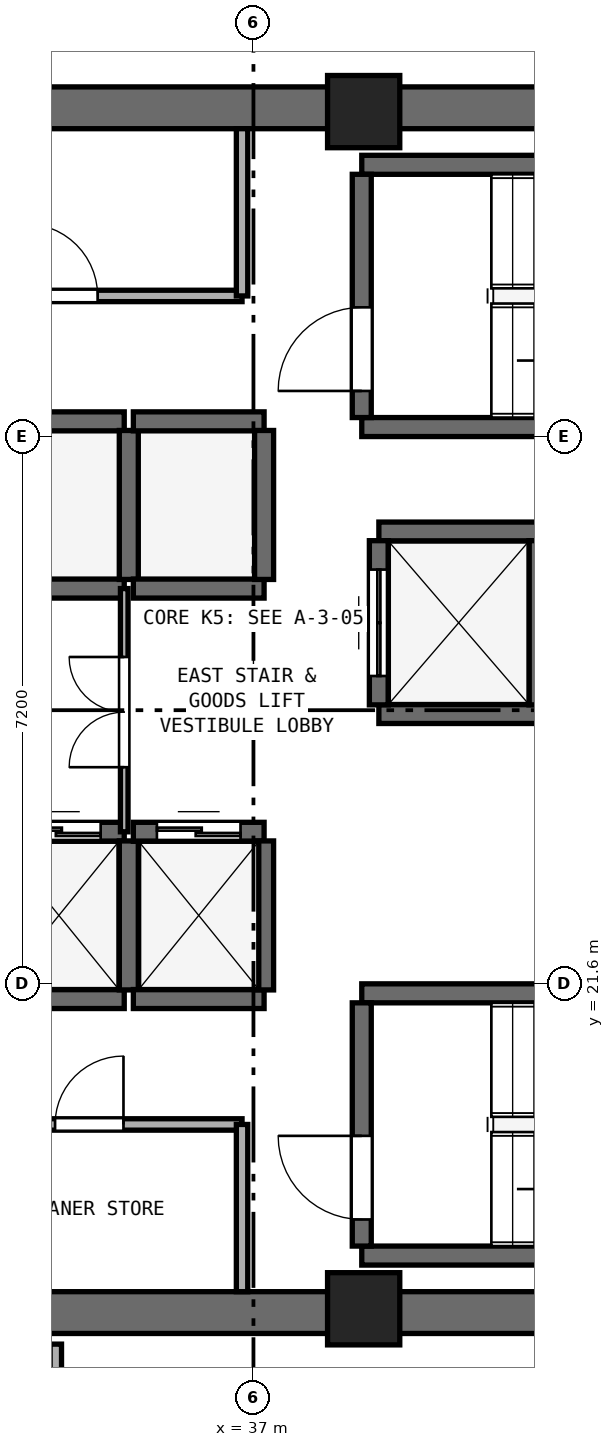
"""IFC4 building model, lengths in metres.
Left out: names, types, materials, properties, quantities, classifications, styles, units other than length and angle.
Written with IfcOpenShell. Run it as: python <this file> out.ifc"""

import sys

from ifc_helpers import new_model, si_unit, direction, frame, frame_2d, origin, origin_2d, place, context, subcontext, project, spatial, rectangle, extrude, element, fill, save


model = new_model("IFC4")
c1 = context("Model", 3, precision=1e-05, world=origin(), true_north=direction((0.0, 1.0)))
c2 = subcontext(c1, "Body", "Model", "MODEL_VIEW")
j1 = project(units=[si_unit("LENGTHUNIT", "METRE"), si_unit("PLANEANGLEUNIT", "RADIAN")], contexts=[c1])
p1 = place(None, origin())
s1 = spatial("IfcSite", under=j1, at=p1, CompositionType="ELEMENT")
p2 = place(p1, origin())
s2 = spatial("IfcBuilding", under=s1, at=p2, CompositionType="ELEMENT")
p3 = place(p2, frame((0.0, 0.0, 170.6)))
s3 = spatial("IfcBuildingStorey", under=s2, at=p3, CompositionType="ELEMENT", Elevation=170.6)
for number, where, z_axis, x_axis in (
    (1, (25.4, 17.275, 0.0), (0.0, 0.0, 1.0), (1.0, 0.0, 0.0)),
    (2, (25.4, 33.125, 0.0), (0.0, 0.0, 1.0), (1.0, 0.0, 0.0)),
):
    element("IfcWall", number, at=place(p3, frame(where, z_axis=z_axis, x_axis=x_axis)), inside=s3, PredefinedType="SHEAR", context=c2, shape_type="SweptSolid", body=[
        extrude(rectangle(XDim=23.2, YDim=0.55, at=frame_2d((11.6, 0.0))), origin(), (0.0, 0.0, 1.0), 3.54),
    ])
for number, where, z_axis, x_axis in (
    (3, (38.45, 17.325, 0.0), (0.0, 0.0, 1.0), (1.0, 0.0, 0.0)),
    (4, (38.45, 33.075, 0.0), (0.0, 0.0, 1.0), (1.0, 0.0, 0.0)),
):
    element("IfcColumn", number, at=place(p3, frame(where, z_axis=z_axis, x_axis=x_axis)), inside=s3, PredefinedType="PILASTER", context=c2, shape_type="SweptSolid", body=[
        extrude(rectangle(XDim=0.95, YDim=0.95, at=origin_2d()), origin(), (0.0, 0.0, 1.0), 3.8),
    ])
for number, where, z_axis, x_axis in (
    (5, (38.425, 28.925, 0.0), (0.0, 0.0, 1.0), (1.0, 0.0, 0.0)),
    (6, (38.425, 32.375, 0.0), (0.0, 0.0, 1.0), (1.0, 0.0, 0.0)),
):
    element("IfcWall", number, at=place(p3, frame(where, z_axis=z_axis, x_axis=x_axis)), inside=s3, PredefinedType="SHEAR", context=c2, shape_type="SweptSolid", body=[
        extrude(rectangle(XDim=7.3, YDim=0.25, at=frame_2d((3.65, 0.0))), origin(), (0.0, 0.0, 1.0), 3.54),
    ])
p4 = place(p3, frame((38.425, 29.05, 0.0), z_axis=(0.0, 0.0, 1.0), x_axis=(0.0, 1.0, 0.0)))
e7 = element("IfcWall", 7, at=p4, inside=s3, PredefinedType="SHEAR", context=c2, shape_type="SweptSolid", body=[
    extrude(rectangle(XDim=3.2, YDim=0.25, at=frame_2d((1.6, 0.0))), origin(), (0.0, 0.0, 1.0), 3.54),
])
p5 = place(p4, frame((0.35, 0.0, 0.0)))
e8 = element("IfcOpeningElement", 8, at=p5, cuts=e7, PredefinedType="OPENING", context=c2, shape_type="SweptSolid", body=[
    extrude(rectangle(XDim=1.1, YDim=2.15, at=frame_2d((0.55, 1.075))), frame((0.0, 0.135, 0.0), z_axis=(0.0, -1.0, 0.0), x_axis=(1.0, 0.0, 0.0)), (0.0, 0.0, 1.0), 0.27),
])
for number, where, z_axis, x_axis in (
    (9, (38.425, 18.025, 0.0), (0.0, 0.0, 1.0), (1.0, 0.0, 0.0)),
    (10, (38.425, 21.475, 0.0), (0.0, 0.0, 1.0), (1.0, 0.0, 0.0)),
):
    element("IfcWall", number, at=place(p3, frame(where, z_axis=z_axis, x_axis=x_axis)), inside=s3, PredefinedType="SHEAR", context=c2, shape_type="SweptSolid", body=[
        extrude(rectangle(XDim=7.3, YDim=0.25, at=frame_2d((3.65, 0.0))), origin(), (0.0, 0.0, 1.0), 3.54),
    ])
p6 = place(p3, frame((38.425, 18.15, 0.0), z_axis=(0.0, 0.0, 1.0), x_axis=(0.0, 1.0, 0.0)))
e11 = element("IfcWall", 11, at=p6, inside=s3, PredefinedType="SHEAR", context=c2, shape_type="SweptSolid", body=[
    extrude(rectangle(XDim=3.2, YDim=0.25, at=frame_2d((1.6, 0.0))), origin(), (0.0, 0.0, 1.0), 3.54),
])
p7 = place(p6, frame((0.35, 0.0, 0.0)))
e12 = element("IfcOpeningElement", 12, at=p7, cuts=e11, PredefinedType="OPENING", context=c2, shape_type="SweptSolid", body=[
    extrude(rectangle(XDim=1.1, YDim=2.15, at=frame_2d((0.55, 1.075))), frame((0.0, 0.135, 0.0), z_axis=(0.0, -1.0, 0.0), x_axis=(1.0, 0.0, 0.0)), (0.0, 0.0, 1.0), 0.27),
])
p8 = place(p3, frame((33.58, 21.4, 0.0), z_axis=(0.0, 0.0, 1.0), x_axis=(1.0, 0.0, 0.0)))
e13 = element("IfcWall", 13, at=p8, inside=s3, PredefinedType="SHEAR", context=c2, shape_type="SweptSolid", body=[
    extrude(rectangle(XDim=1.72, YDim=0.25, at=frame_2d((0.86, 0.0))), origin(), (0.0, 0.0, 1.0), 3.54),
])
p9 = place(p3, frame((33.58, 23.6, 0.0), z_axis=(0.0, 0.0, 1.0), x_axis=(1.0, 0.0, 0.0)))
e14 = element("IfcWall", 14, at=p9, inside=s3, PredefinedType="SHEAR", context=c2, shape_type="SweptSolid", body=[
    extrude(rectangle(XDim=1.72, YDim=0.25, at=frame_2d((0.86, 0.0))), origin(), (0.0, 0.0, 1.0), 3.54),
])
p10 = place(p9, frame((0.31, 0.0, 0.0)))
e15 = element("IfcOpeningElement", 15, at=p10, cuts=e14, PredefinedType="OPENING", context=c2, shape_type="SweptSolid", body=[
    extrude(rectangle(XDim=1.1, YDim=2.15, at=frame_2d((0.55, 1.075))), frame((0.0, 0.135, 0.0), z_axis=(0.0, -1.0, 0.0), x_axis=(1.0, 0.0, 0.0)), (0.0, 0.0, 1.0), 0.27),
])
p11 = place(p3, frame((35.36, 21.52, 0.0), z_axis=(0.0, 0.0, 1.0), x_axis=(0.0, 1.0, 0.0)))
e16 = element("IfcWall", 16, at=p11, inside=s3, PredefinedType="SHEAR", context=c2, shape_type="SweptSolid", body=[
    extrude(rectangle(XDim=1.96, YDim=0.25, at=frame_2d((0.98, 0.0))), origin(), (0.0, 0.0, 1.0), 3.54),
])
p12 = place(p3, frame((35.42, 21.4, 0.0), z_axis=(0.0, 0.0, 1.0), x_axis=(1.0, 0.0, 0.0)))
e17 = element("IfcWall", 17, at=p12, inside=s3, PredefinedType="SHEAR", context=c2, shape_type="SweptSolid", body=[
    extrude(rectangle(XDim=1.72, YDim=0.25, at=frame_2d((0.86, 0.0))), origin(), (0.0, 0.0, 1.0), 3.54),
])
p13 = place(p3, frame((35.42, 23.6, 0.0), z_axis=(0.0, 0.0, 1.0), x_axis=(1.0, 0.0, 0.0)))
e18 = element("IfcWall", 18, at=p13, inside=s3, PredefinedType="SHEAR", context=c2, shape_type="SweptSolid", body=[
    extrude(rectangle(XDim=1.72, YDim=0.25, at=frame_2d((0.86, 0.0))), origin(), (0.0, 0.0, 1.0), 3.54),
])
p14 = place(p13, frame((0.31, 0.0, 0.0)))
e19 = element("IfcOpeningElement", 19, at=p14, cuts=e18, PredefinedType="OPENING", context=c2, shape_type="SweptSolid", body=[
    extrude(rectangle(XDim=1.1, YDim=2.15, at=frame_2d((0.55, 1.075))), frame((0.0, 0.135, 0.0), z_axis=(0.0, -1.0, 0.0), x_axis=(1.0, 0.0, 0.0)), (0.0, 0.0, 1.0), 0.27),
])
p15 = place(p3, frame((37.14, 21.52, 0.0), z_axis=(0.0, 0.0, 1.0), x_axis=(0.0, 1.0, 0.0)))
e20 = element("IfcWall", 20, at=p15, inside=s3, PredefinedType="SHEAR", context=c2, shape_type="SweptSolid", body=[
    extrude(rectangle(XDim=1.96, YDim=0.25, at=frame_2d((0.98, 0.0))), origin(), (0.0, 0.0, 1.0), 3.54),
])
for number, where, z_axis, x_axis in (
    (21, (33.58, 26.8, 0.0), (0.0, 0.0, 1.0), (1.0, 0.0, 0.0)),
    (22, (33.58, 29.0, 0.0), (0.0, 0.0, 1.0), (1.0, 0.0, 0.0)),
):
    element("IfcWall", number, at=place(p3, frame(where, z_axis=z_axis, x_axis=x_axis)), inside=s3, PredefinedType="SHEAR", context=c2, shape_type="SweptSolid", body=[
        extrude(rectangle(XDim=1.72, YDim=0.25, at=frame_2d((0.86, 0.0))), origin(), (0.0, 0.0, 1.0), 3.54),
    ])
p16 = place(p3, frame((35.36, 26.92, 0.0), z_axis=(0.0, 0.0, 1.0), x_axis=(0.0, 1.0, 0.0)))
e23 = element("IfcWall", 23, at=p16, inside=s3, PredefinedType="SHEAR", context=c2, shape_type="SweptSolid", body=[
    extrude(rectangle(XDim=1.96, YDim=0.25, at=frame_2d((0.98, 0.0))), origin(), (0.0, 0.0, 1.0), 3.54),
])
for number, where, z_axis, x_axis in (
    (24, (35.42, 26.8, 0.0), (0.0, 0.0, 1.0), (1.0, 0.0, 0.0)),
    (25, (35.42, 29.0, 0.0), (0.0, 0.0, 1.0), (1.0, 0.0, 0.0)),
):
    element("IfcWall", number, at=place(p3, frame(where, z_axis=z_axis, x_axis=x_axis)), inside=s3, PredefinedType="SHEAR", context=c2, shape_type="SweptSolid", body=[
        extrude(rectangle(XDim=1.72, YDim=0.25, at=frame_2d((0.86, 0.0))), origin(), (0.0, 0.0, 1.0), 3.54),
    ])
p17 = place(p3, frame((37.14, 26.92, 0.0), z_axis=(0.0, 0.0, 1.0), x_axis=(0.0, 1.0, 0.0)))
e26 = element("IfcWall", 26, at=p17, inside=s3, PredefinedType="SHEAR", context=c2, shape_type="SweptSolid", body=[
    extrude(rectangle(XDim=1.96, YDim=0.25, at=frame_2d((0.98, 0.0))), origin(), (0.0, 0.0, 1.0), 3.54),
])
for number, where, z_axis, x_axis in (
    (27, (38.65, 25.15, 0.0), (0.0, 0.0, 1.0), (1.0, 0.0, 0.0)),
    (28, (38.65, 27.55, 0.0), (0.0, 0.0, 1.0), (1.0, 0.0, 0.0)),
):
    element("IfcWall", number, at=place(p3, frame(where, z_axis=z_axis, x_axis=x_axis)), inside=s3, PredefinedType="SHEAR", context=c2, shape_type="SweptSolid", body=[
        extrude(rectangle(XDim=2.1, YDim=0.25, at=frame_2d((1.05, 0.0))), origin(), (0.0, 0.0, 1.0), 3.54),
    ])
p18 = place(p3, frame((38.65, 25.27, 0.0), z_axis=(0.0, 0.0, 1.0), x_axis=(0.0, 1.0, 0.0)))
e29 = element("IfcWall", 29, at=p18, inside=s3, PredefinedType="SHEAR", context=c2, shape_type="SweptSolid", body=[
    extrude(rectangle(XDim=2.16, YDim=0.25, at=frame_2d((1.08, 0.0))), origin(), (0.0, 0.0, 1.0), 3.54),
])
p19 = place(p18, frame((0.38, 0.0, 0.0)))
e30 = element("IfcOpeningElement", 30, at=p19, cuts=e29, PredefinedType="OPENING", context=c2, shape_type="SweptSolid", body=[
    extrude(rectangle(XDim=1.4, YDim=2.2, at=frame_2d((0.7, 1.1))), frame((0.0, 0.135, 0.0), z_axis=(0.0, -1.0, 0.0), x_axis=(1.0, 0.0, 0.0)), (0.0, 0.0, 1.0), 0.27),
])
p20 = place(p3, frame((40.75, 25.27, 0.0), z_axis=(0.0, 0.0, 1.0), x_axis=(0.0, 1.0, 0.0)))
e31 = element("IfcWall", 31, at=p20, inside=s3, PredefinedType="SHEAR", context=c2, shape_type="SweptSolid", body=[
    extrude(rectangle(XDim=2.16, YDim=0.25, at=frame_2d((1.08, 0.0))), origin(), (0.0, 0.0, 1.0), 3.54),
])
p21 = place(p3, frame((32.1, 30.65, 0.0), z_axis=(0.0, 0.0, 1.0), x_axis=(1.0, 0.0, 0.0)))
e32 = element("IfcWall", 32, at=p21, inside=s3, PredefinedType="PARTITIONING", context=c2, shape_type="SweptSolid", body=[
    extrude(rectangle(XDim=4.75, YDim=0.15, at=frame_2d((2.375, 0.0))), origin(), (0.0, 0.0, 1.0), 3.54),
])
p22 = place(p21, frame((1.9, 0.0, 0.0)))
e33 = element("IfcOpeningElement", 33, at=p22, cuts=e32, PredefinedType="OPENING", context=c2, shape_type="SweptSolid", body=[
    extrude(rectangle(XDim=0.95, YDim=2.1, at=frame_2d((0.475, 1.05))), frame((0.0, 0.085, 0.0), z_axis=(0.0, -1.0, 0.0), x_axis=(1.0, 0.0, 0.0)), (0.0, 0.0, 1.0), 0.17),
])
p23 = place(p3, frame((36.85, 30.65, 0.0), z_axis=(0.0, 0.0, 1.0), x_axis=(0.0, 1.0, 0.0)))
e34 = element("IfcWall", 34, at=p23, inside=s3, PredefinedType="PARTITIONING", context=c2, shape_type="SweptSolid", body=[
    extrude(rectangle(XDim=2.2, YDim=0.15, at=frame_2d((1.1, 0.0))), origin(), (0.0, 0.0, 1.0), 3.54),
])
p24 = place(p3, frame((32.83, 19.75, 0.0), z_axis=(0.0, 0.0, 1.0), x_axis=(1.0, 0.0, 0.0)))
e35 = element("IfcWall", 35, at=p24, inside=s3, PredefinedType="PARTITIONING", context=c2, shape_type="SweptSolid", body=[
    extrude(rectangle(XDim=4.02, YDim=0.15, at=frame_2d((2.01, 0.0))), origin(), (0.0, 0.0, 1.0), 3.54),
])
p25 = place(p24, frame((1.56, 0.0, 0.0)))
e36 = element("IfcOpeningElement", 36, at=p25, cuts=e35, PredefinedType="OPENING", context=c2, shape_type="SweptSolid", body=[
    extrude(rectangle(XDim=0.9, YDim=2.1, at=frame_2d((0.45, 1.05))), frame((0.0, 0.085, 0.0), z_axis=(0.0, -1.0, 0.0), x_axis=(1.0, 0.0, 0.0)), (0.0, 0.0, 1.0), 0.17),
])
p26 = place(p3, frame((36.85, 17.55, 0.0), z_axis=(0.0, 0.0, 1.0), x_axis=(0.0, 1.0, 0.0)))
e37 = element("IfcWall", 37, at=p26, inside=s3, PredefinedType="PARTITIONING", context=c2, shape_type="SweptSolid", body=[
    extrude(rectangle(XDim=2.2, YDim=0.15, at=frame_2d((1.1, 0.0))), origin(), (0.0, 0.0, 1.0), 3.54),
])
p27 = place(p3, frame((35.3, 23.6, 0.0), z_axis=(0.0, 0.0, 1.0), x_axis=(0.0, 1.0, 0.0)))
e38 = element("IfcWall", 38, at=p27, inside=s3, PredefinedType="PARTITIONING", context=c2, shape_type="SweptSolid", body=[
    extrude(rectangle(XDim=3.2, YDim=0.1, at=frame_2d((1.6, 0.0))), origin(), (0.0, 0.0, 1.0), 3.54),
])
p28 = place(p27, frame((0.85, 0.0, 0.0)))
e39 = element("IfcOpeningElement", 39, at=p28, cuts=e38, PredefinedType="OPENING", context=c2, shape_type="SweptSolid", body=[
    extrude(rectangle(XDim=1.45, YDim=2.12, at=frame_2d((0.725, 1.06))), frame((0.0, 0.06, 0.0), z_axis=(0.0, -1.0, 0.0), x_axis=(1.0, 0.0, 0.0)), (0.0, 0.0, 1.0), 0.12),
])
p29 = place(p3, frame((34.4, 15.2, 0.0), z_axis=(0.0, 0.0, 1.0), x_axis=(0.0, 1.0, 0.0)))
e40 = element("IfcWall", 40, at=p29, inside=s3, PredefinedType="PARTITIONING", context=c2, shape_type="SweptSolid", body=[
    extrude(rectangle(XDim=1.66, YDim=0.15, at=frame_2d((0.83, 0.0))), origin(), (0.0, 0.0, 1.0), 3.54),
])
p30 = place(p5, origin())
e41 = element("IfcDoor", 41, at=p30, inside=s3, OperationType="SINGLE_SWING_LEFT", PredefinedType="DOOR", context=c2, shape_type="SweptSolid", body=[
    extrude(rectangle(XDim=1.1, YDim=2.15, at=frame_2d((0.55, 1.075))), frame((0.0, 0.025, 0.0), z_axis=(0.0, -1.0, 0.0), x_axis=(1.0, 0.0, 0.0)), (0.0, 0.0, 1.0), 0.05),
])
fill(e8, e41)
p31 = place(p7, origin())
e42 = element("IfcDoor", 42, at=p31, inside=s3, OperationType="SINGLE_SWING_RIGHT", PredefinedType="DOOR", context=c2, shape_type="SweptSolid", body=[
    extrude(rectangle(XDim=1.1, YDim=2.15, at=frame_2d((0.55, 1.075))), frame((0.0, 0.025, 0.0), z_axis=(0.0, -1.0, 0.0), x_axis=(1.0, 0.0, 0.0)), (0.0, 0.0, 1.0), 0.05),
])
fill(e12, e42)
p32 = place(p10, origin())
e43 = element("IfcDoor", 43, at=p32, inside=s3, OperationType="DOUBLE_DOOR_SLIDING", PredefinedType="DOOR", context=c2, shape_type="SweptSolid", body=[
    extrude(rectangle(XDim=1.1, YDim=2.15, at=frame_2d((0.55, 1.075))), frame((0.0, 0.025, 0.0), z_axis=(0.0, -1.0, 0.0), x_axis=(1.0, 0.0, 0.0)), (0.0, 0.0, 1.0), 0.05),
])
fill(e15, e43)
p33 = place(p14, origin())
e44 = element("IfcDoor", 44, at=p33, inside=s3, OperationType="DOUBLE_DOOR_SLIDING", PredefinedType="DOOR", context=c2, shape_type="SweptSolid", body=[
    extrude(rectangle(XDim=1.1, YDim=2.15, at=frame_2d((0.55, 1.075))), frame((0.0, 0.025, 0.0), z_axis=(0.0, -1.0, 0.0), x_axis=(1.0, 0.0, 0.0)), (0.0, 0.0, 1.0), 0.05),
])
fill(e19, e44)
p34 = place(p19, origin())
e45 = element("IfcDoor", 45, at=p34, inside=s3, OperationType="DOUBLE_DOOR_SLIDING", PredefinedType="DOOR", context=c2, shape_type="SweptSolid", body=[
    extrude(rectangle(XDim=1.4, YDim=2.2, at=frame_2d((0.7, 1.1))), frame((0.0, 0.025, 0.0), z_axis=(0.0, -1.0, 0.0), x_axis=(1.0, 0.0, 0.0)), (0.0, 0.0, 1.0), 0.05),
])
fill(e30, e45)
p35 = place(p22, origin())
e46 = element("IfcDoor", 46, at=p35, inside=s3, OperationType="SINGLE_SWING_LEFT", PredefinedType="DOOR", context=c2, shape_type="SweptSolid", body=[
    extrude(rectangle(XDim=0.95, YDim=2.1, at=frame_2d((0.475, 1.05))), frame((0.0, 0.025, 0.0), z_axis=(0.0, -1.0, 0.0), x_axis=(1.0, 0.0, 0.0)), (0.0, 0.0, 1.0), 0.05),
])
fill(e33, e46)
p36 = place(p25, origin())
e47 = element("IfcDoor", 47, at=p36, inside=s3, OperationType="SINGLE_SWING_RIGHT", PredefinedType="DOOR", context=c2, shape_type="SweptSolid", body=[
    extrude(rectangle(XDim=0.9, YDim=2.1, at=frame_2d((0.45, 1.05))), frame((0.0, 0.025, 0.0), z_axis=(0.0, -1.0, 0.0), x_axis=(1.0, 0.0, 0.0)), (0.0, 0.0, 1.0), 0.05),
])
fill(e36, e47)
p37 = place(p28, origin())
e48 = element("IfcDoor", 48, at=p37, inside=s3, OperationType="DOUBLE_DOOR_SINGLE_SWING", PredefinedType="DOOR", context=c2, shape_type="SweptSolid", body=[
    extrude(rectangle(XDim=1.45, YDim=2.12, at=frame_2d((0.725, 1.06))), frame((0.0, 0.025, 0.0), z_axis=(0.0, -1.0, 0.0), x_axis=(1.0, 0.0, 0.0)), (0.0, 0.0, 1.0), 0.05),
])
fill(e39, e48)
save(model, sys.argv[1])
